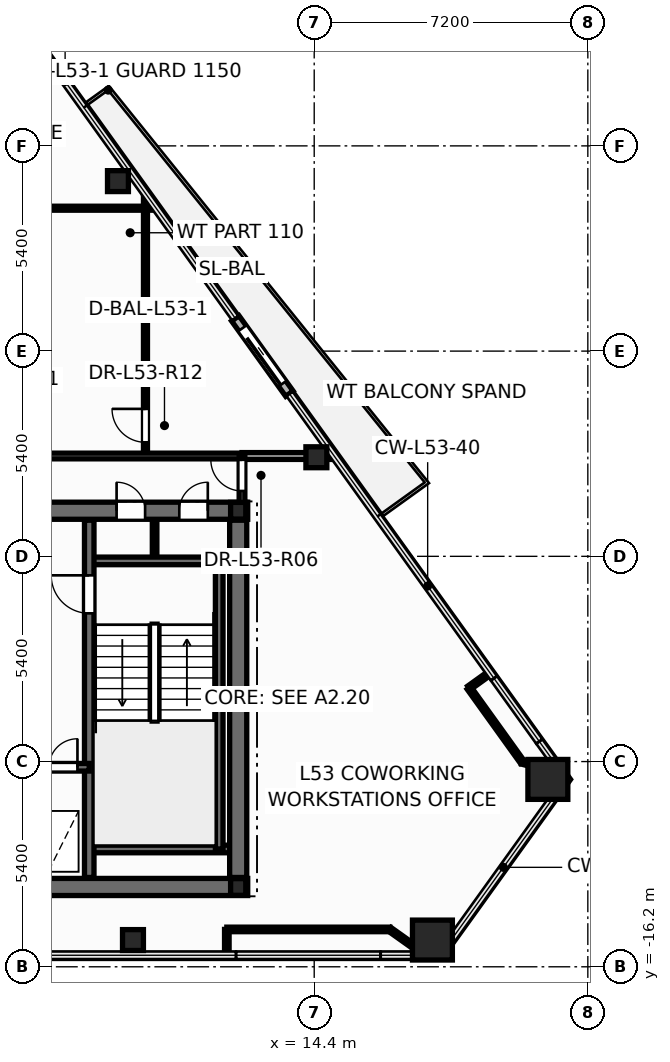
"""IFC4 building model, lengths in metres.
Left out: names, types, materials, properties, quantities, classifications, styles, units other than length and angle.
Written with IfcOpenShell. Run it as: python <this file> out.ifc"""

import sys

from ifc_helpers import new_model, si_unit, direction, frame, frame_2d, origin, origin_2d, place, context, subcontext, project, spatial, rectangle, hollow_rectangle, hollow_circle, i_section, extrude, element, fill, save


model = new_model("IFC4")
c1 = context("Model", 3, precision=1e-05, world=origin(), true_north=direction((0.0, 1.0)))
c2 = subcontext(c1, "Body", "Model", "MODEL_VIEW")
j1 = project(units=[si_unit("LENGTHUNIT", "METRE"), si_unit("PLANEANGLEUNIT", "RADIAN")], contexts=[c1])
p1 = place(None, origin())
s1 = spatial("IfcSite", under=j1, at=p1, CompositionType="ELEMENT")
p2 = place(p1, origin())
s2 = spatial("IfcBuilding", under=s1, at=p2, CompositionType="ELEMENT")
p3 = place(p2, frame((0.0, 0.0, 203.7)))
s3 = spatial("IfcBuildingStorey", under=s2, at=p3, CompositionType="ELEMENT", Elevation=203.7)
for number, where, z_axis, x_axis in (
    (1, (17.511, -15.497, 0.0), (0.0, 0.0, 1.0), (1.0, 0.0, 0.0)),
    (2, (20.548, -11.27, 0.0), (0.0, 0.0, 1.0), (1.0, 0.0, 0.0)),
):
    element("IfcColumn", number, at=place(p3, frame(where, z_axis=z_axis, x_axis=x_axis)), inside=s3, PredefinedType="COLUMN", context=c2, shape_type="SweptSolid", body=[
        extrude(hollow_rectangle(XDim=1.05, YDim=1.05, WallThickness=0.045, at=origin_2d()), origin(), (0.0, 0.0, 1.0), 3.6),
    ])
for number, where, z_axis, x_axis in (
    (3, (9.631, -15.497, 0.0), (0.0, 0.0, 1.0), (1.0, 0.0, 0.0)),
    (4, (14.457, -2.793, 0.0), (0.0, 0.0, 1.0), (1.0, 0.0, 0.0)),
    (5, (9.236, 4.473, 0.0), (0.0, 0.0, 1.0), (1.0, 0.0, 0.0)),
):
    element("IfcColumn", number, at=place(p3, frame(where, z_axis=z_axis, x_axis=x_axis)), inside=s3, PredefinedType="COLUMN", context=c2, shape_type="SweptSolid", body=[
        extrude(hollow_circle(Radius=0.275, WallThickness=0.024, at=origin_2d()), origin(), (0.0, 0.0, 1.0), 3.6),
    ])
for number, where, z_axis, x_axis in (
    (6, (12.4, -14.1, 0.0), (0.0, 0.0, 1.0), (1.0, 0.0, 0.0)),
    (7, (12.4, -4.2, 0.0), (0.0, 0.0, 1.0), (1.0, 0.0, 0.0)),
):
    element("IfcColumn", number, at=place(p3, frame(where, z_axis=z_axis, x_axis=x_axis)), inside=s3, PredefinedType="COLUMN", context=c2, shape_type="SweptSolid", body=[
        extrude(i_section(OverallWidth=0.4, OverallDepth=0.44, WebThickness=0.028, FlangeThickness=0.04, at=origin_2d()), origin(), (0.0, 0.0, 1.0), 3.6),
    ])
p4 = place(p3, frame((13.747, -1.12, -0.015), z_axis=(0.0, 0.0, 1.0), x_axis=(-0.58349791381, 0.812114637585, 0.0)))
e8 = element("IfcWall", 8, at=p4, inside=s3, PredefinedType="STANDARD", context=c2, shape_type="SweptSolid", body=[
    extrude(rectangle(XDim=2.44, YDim=0.24, at=frame_2d((1.22, 0.0))), origin(), (0.0, 0.0, 1.0), 2.802),
])
p5 = place(p4, frame((0.32, 0.0, 0.015)))
e9 = element("IfcOpeningElement", 9, at=p5, cuts=e8, PredefinedType="OPENING", context=c2, shape_type="SweptSolid", body=[
    extrude(rectangle(XDim=1.806, YDim=2.204, at=frame_2d((0.9, 1.102))), frame((0.0, 0.13, 0.0), z_axis=(0.0, -1.0, 0.0), x_axis=(1.0, 0.0, 0.0)), (0.0, 0.0, 1.0), 0.26),
])
p6 = place(p3, frame((10.2, -5.52, 0.0), z_axis=(0.0, 0.0, 1.0), x_axis=(0.0, 1.0, 0.0)))
e10 = element("IfcWall", 10, at=p6, inside=s3, PredefinedType="PARTITIONING", context=c2, shape_type="SweptSolid", body=[
    extrude(rectangle(XDim=1.12, YDim=0.12, at=frame_2d((0.56, 0.0))), origin(), (0.0, 0.0, 1.0), 3.345),
])
p7 = place(p3, frame((-12.65, -14.1, 0.0), z_axis=(0.0, 0.0, 1.0), x_axis=(1.0, 0.0, 0.0)))
e11 = element("IfcWall", 11, at=p7, inside=s3, PredefinedType="SHEAR", context=c2, shape_type="SweptSolid", body=[
    extrude(rectangle(XDim=25.3, YDim=0.45, at=frame_2d((12.65, 0.0))), origin(), (0.0, 0.0, 1.0), 3.6),
])
p8 = place(p3, frame((-12.65, -4.2, 0.0), z_axis=(0.0, 0.0, 1.0), x_axis=(1.0, 0.0, 0.0)))
e12 = element("IfcWall", 12, at=p8, inside=s3, PredefinedType="SHEAR", context=c2, shape_type="SweptSolid", body=[
    extrude(rectangle(XDim=25.3, YDim=0.45, at=frame_2d((12.65, 0.0))), origin(), (0.0, 0.0, 1.0), 3.6),
])
p9 = place(p8, frame((0.95, 0.0, 0.0)))
e13 = element("IfcOpeningElement", 13, at=p9, cuts=e12, PredefinedType="OPENING", context=c2, shape_type="SweptSolid", body=[
    extrude(rectangle(XDim=0.756, YDim=2.054, at=frame_2d((0.375, 1.027))), frame((0.0, 0.235, 0.0), z_axis=(0.0, -1.0, 0.0), x_axis=(1.0, 0.0, 0.0)), (0.0, 0.0, 1.0), 0.47),
])
p10 = place(p8, frame((2.6, 0.0, 0.0)))
e14 = element("IfcOpeningElement", 14, at=p10, cuts=e12, PredefinedType="OPENING", context=c2, shape_type="SweptSolid", body=[
    extrude(rectangle(XDim=0.756, YDim=2.054, at=frame_2d((0.375, 1.027))), frame((0.0, 0.235, 0.0), z_axis=(0.0, -1.0, 0.0), x_axis=(1.0, 0.0, 0.0)), (0.0, 0.0, 1.0), 0.47),
])
p11 = place(p8, frame((21.85, 0.0, 0.0)))
e15 = element("IfcOpeningElement", 15, at=p11, cuts=e12, PredefinedType="OPENING", context=c2, shape_type="SweptSolid", body=[
    extrude(rectangle(XDim=0.756, YDim=2.054, at=frame_2d((0.375, 1.027))), frame((0.0, 0.235, 0.0), z_axis=(0.0, -1.0, 0.0), x_axis=(1.0, 0.0, 0.0)), (0.0, 0.0, 1.0), 0.47),
])
p12 = place(p8, frame((23.5, 0.0, 0.0)))
e16 = element("IfcOpeningElement", 16, at=p12, cuts=e12, PredefinedType="OPENING", context=c2, shape_type="SweptSolid", body=[
    extrude(rectangle(XDim=0.756, YDim=2.054, at=frame_2d((0.375, 1.027))), frame((0.0, 0.235, 0.0), z_axis=(0.0, -1.0, 0.0), x_axis=(1.0, 0.0, 0.0)), (0.0, 0.0, 1.0), 0.47),
])
p13 = place(p8, frame((5.85, 0.0, 0.0)))
e17 = element("IfcOpeningElement", 17, at=p13, cuts=e12, PredefinedType="OPENING", context=c2, shape_type="SweptSolid", body=[
    extrude(rectangle(XDim=1.006, YDim=2.104, at=frame_2d((0.5, 1.052))), frame((0.0, 0.235, 0.0), z_axis=(0.0, -1.0, 0.0), x_axis=(1.0, 0.0, 0.0)), (0.0, 0.0, 1.0), 0.47),
])
p14 = place(p8, frame((10.35, 0.0, 0.0)))
e18 = element("IfcOpeningElement", 18, at=p14, cuts=e12, PredefinedType="OPENING", context=c2, shape_type="SweptSolid", body=[
    extrude(rectangle(XDim=1.406, YDim=2.154, at=frame_2d((0.7, 1.077))), frame((0.0, 0.235, 0.0), z_axis=(0.0, -1.0, 0.0), x_axis=(1.0, 0.0, 0.0)), (0.0, 0.0, 1.0), 0.47),
])
p15 = place(p8, frame((18.45, 0.0, 0.0)))
e19 = element("IfcOpeningElement", 19, at=p15, cuts=e12, PredefinedType="OPENING", context=c2, shape_type="SweptSolid", body=[
    extrude(rectangle(XDim=1.006, YDim=2.104, at=frame_2d((0.5, 1.052))), frame((0.0, 0.235, 0.0), z_axis=(0.0, -1.0, 0.0), x_axis=(1.0, 0.0, 0.0)), (0.0, 0.0, 1.0), 0.47),
])
for number, where, z_axis, x_axis in (
    (20, (8.48, -5.52, 0.0), (0.0, 0.0, 1.0), (1.0, 0.0, 0.0)),
    (21, (8.48, -13.1, 0.0), (0.0, 0.0, 1.0), (1.0, 0.0, 0.0)),
):
    element("IfcWall", number, at=place(p3, frame(where, z_axis=z_axis, x_axis=x_axis)), inside=s3, PredefinedType="SOLIDWALL", context=c2, shape_type="SweptSolid", body=[
        extrude(rectangle(XDim=3.87, YDim=0.2, at=frame_2d((1.935, 0.0))), origin(), (0.0, 0.0, 1.0), 3.6),
    ])
p16 = place(p3, frame((11.9, -13.1, 0.0), z_axis=(0.0, 0.0, 1.0), x_axis=(0.0, 1.0, 0.0)))
e22 = element("IfcWall", 22, at=p16, inside=s3, PredefinedType="SOLIDWALL", context=c2, shape_type="SweptSolid", body=[
    extrude(rectangle(XDim=7.58, YDim=0.2, at=frame_2d((3.79, 0.0))), origin(), (0.0, 0.0, 1.0), 3.6),
])
p17 = place(p3, frame((8.48, -13.85, 0.0), z_axis=(0.0, 0.0, 1.0), x_axis=(0.0, 1.0, 0.0)))
e23 = element("IfcWall", 23, at=p17, inside=s3, PredefinedType="SHEAR", context=c2, shape_type="SweptSolid", body=[
    extrude(rectangle(XDim=9.4, YDim=0.25, at=frame_2d((4.7, 0.0))), origin(), (0.0, 0.0, 1.0), 3.6),
])
p18 = place(p17, frame((6.95, 0.0, 0.0)))
e24 = element("IfcOpeningElement", 24, at=p18, cuts=e23, PredefinedType="OPENING", context=c2, shape_type="SweptSolid", body=[
    extrude(rectangle(XDim=1.006, YDim=2.104, at=frame_2d((0.5, 1.052))), frame((0.0, 0.135, 0.0), z_axis=(0.0, -1.0, 0.0), x_axis=(1.0, 0.0, 0.0)), (0.0, 0.0, 1.0), 0.27),
])
p19 = place(p3, frame((5.12, -10.95, 0.0), z_axis=(0.0, 0.0, 1.0), x_axis=(1.0, 0.0, 0.0)))
e25 = element("IfcWall", 25, at=p19, inside=s3, PredefinedType="SOLIDWALL", context=c2, shape_type="SweptSolid", body=[
    extrude(rectangle(XDim=3.36, YDim=0.2, at=frame_2d((1.68, 0.0))), origin(), (0.0, 0.0, 1.0), 3.6),
])
p20 = place(p19, frame((0.42, 0.0, 0.0)))
e26 = element("IfcOpeningElement", 26, at=p20, cuts=e25, PredefinedType="OPENING", context=c2, shape_type="SweptSolid", body=[
    extrude(rectangle(XDim=1.106, YDim=2.104, at=frame_2d((0.55, 1.052))), frame((0.0, 0.11, 0.0), z_axis=(0.0, -1.0, 0.0), x_axis=(1.0, 0.0, 0.0)), (0.0, 0.0, 1.0), 0.22),
])
p21 = place(p19, frame((2.3, 0.0, 0.0)))
e27 = element("IfcOpeningElement", 27, at=p21, cuts=e25, PredefinedType="OPENING", context=c2, shape_type="SweptSolid", body=[
    extrude(rectangle(XDim=0.756, YDim=2.054, at=frame_2d((0.375, 1.027))), frame((0.0, 0.11, 0.0), z_axis=(0.0, -1.0, 0.0), x_axis=(1.0, 0.0, 0.0)), (0.0, 0.0, 1.0), 0.22),
])
p22 = place(p3, frame((12.4, -13.85, 0.0), z_axis=(0.0, 0.0, 1.0), x_axis=(0.0, 1.0, 0.0)))
e28 = element("IfcWall", 28, at=p22, inside=s3, PredefinedType="SHEAR", context=c2, shape_type="SweptSolid", body=[
    extrude(rectangle(XDim=9.4, YDim=0.45, at=frame_2d((4.7, 0.0))), origin(), (0.0, 0.0, 1.0), 3.6),
])
p23 = place(p3, frame((9.96, -2.76, 0.0), z_axis=(0.0, 0.0, 1.0), x_axis=(0.0, 1.0, 0.0)))
e29 = element("IfcWall", 29, at=p23, inside=s3, PredefinedType="PARTITIONING", context=c2, shape_type="SweptSolid", body=[
    extrude(rectangle(XDim=6.911, YDim=0.105, at=frame_2d((3.455, 0.0))), origin(), (0.0, 0.0, 1.0), 2.62),
])
p24 = place(p23, frame((0.36, 0.0, 0.0)))
e30 = element("IfcOpeningElement", 30, at=p24, cuts=e29, PredefinedType="OPENING", context=c2, shape_type="SweptSolid", body=[
    extrude(rectangle(XDim=0.886, YDim=2.104, at=frame_2d((0.44, 1.052))), frame((0.0, 0.062, 0.0), z_axis=(0.0, -1.0, 0.0), x_axis=(1.0, 0.0, 0.0)), (0.0, 0.0, 1.0), 0.125),
])
p25 = place(p3, frame((2.68, 3.76, 0.0), z_axis=(0.0, 0.0, 1.0), x_axis=(1.0, 0.0, 0.0)))
e31 = element("IfcWall", 31, at=p25, inside=s3, PredefinedType="PARTITIONING", context=c2, shape_type="SweptSolid", body=[
    extrude(rectangle(XDim=7.561, YDim=0.105, at=frame_2d((3.78, 0.0))), origin(), (0.0, 0.0, 1.0), 2.62),
])
p26 = place(p3, frame((5.762, -2.76, 0.0), z_axis=(0.0, 0.0, 1.0), x_axis=(1.0, 0.0, 0.0)))
e32 = element("IfcWall", 32, at=p26, inside=s3, PredefinedType="PARTITIONING", context=c2, shape_type="SweptSolid", body=[
    extrude(rectangle(XDim=6.738, YDim=0.15, at=frame_2d((3.369, 0.0))), origin(), (0.0, 0.0, 1.0), 2.32),
])
p27 = place(p3, frame((12.101, -15.217, 0.0), z_axis=(0.0, 0.0, 1.0), x_axis=(1.0, 0.0, 0.0)))
e33 = element("IfcWall", 33, at=p27, inside=s3, PredefinedType="PARTITIONING", context=c2, shape_type="SweptSolid", body=[
    extrude(rectangle(XDim=4.288, YDim=0.12, at=frame_2d((2.144, 0.0))), origin(), (0.0, 0.0, 1.0), 3.345),
])
p28 = place(p3, frame((12.5, -2.76, 0.0), z_axis=(0.0, 0.0, 1.0), x_axis=(1.0, 0.0, 0.0)))
e34 = element("IfcWall", 34, at=p28, inside=s3, PredefinedType="PARTITIONING", context=c2, shape_type="SweptSolid", body=[
    extrude(rectangle(XDim=2.426, YDim=0.18, at=frame_2d((1.213, 0.0))), origin(), (0.0, 0.0, 1.0), 2.62),
])
p29 = place(p3, frame((19.874, -10.811, 0.0), z_axis=(0.0, 0.0, 1.0), x_axis=(-0.583564770882, 0.812066597137, 0.0)))
e35 = element("IfcWall", 35, at=p29, inside=s3, PredefinedType="PARTITIONING", context=c2, shape_type="SweptSolid", body=[
    extrude(rectangle(XDim=2.4, YDim=0.12, at=frame_2d((1.2, 0.0))), origin(), (0.0, 0.0, 1.0), 2.32),
])
p30 = place(p3, frame((12.5, -4.24, 0.0), z_axis=(0.0, 0.0, 1.0), x_axis=(0.0, 1.0, 0.0)))
e36 = element("IfcWall", 36, at=p30, inside=s3, PredefinedType="PARTITIONING", context=c2, shape_type="SweptSolid", body=[
    extrude(rectangle(XDim=1.48, YDim=0.15, at=frame_2d((0.74, 0.0))), origin(), (0.0, 0.0, 1.0), 2.32),
])
p31 = place(p30, frame((0.56, 0.0, 0.0)))
e37 = element("IfcOpeningElement", 37, at=p31, cuts=e36, PredefinedType="OPENING", context=c2, shape_type="SweptSolid", body=[
    extrude(rectangle(XDim=0.826, YDim=2.104, at=frame_2d((0.41, 1.052))), frame((0.0, 0.085, 0.0), z_axis=(0.0, -1.0, 0.0), x_axis=(1.0, 0.0, 0.0)), (0.0, 0.0, 1.0), 0.17),
])
p32 = place(p3, frame((16.389, -15.217, 0.0), z_axis=(0.0, 0.0, 1.0), x_axis=(0.814775258606, -0.579776920861, 0.0)))
e38 = element("IfcWall", 38, at=p32, inside=s3, PredefinedType="PARTITIONING", context=c2, shape_type="SweptSolid", body=[
    extrude(rectangle(XDim=0.854, YDim=0.12, at=frame_2d((0.427, 0.0))), origin(), (0.0, 0.0, 1.0), 2.787),
])
p33 = place(p3, frame((20.698, -11.027, 0.0), z_axis=(0.0, 0.0, 1.0), x_axis=(-0.967403978064, 0.253238115667, 0.0)))
e39 = element("IfcWall", 39, at=p33, inside=s3, PredefinedType="PARTITIONING", context=c2, shape_type="SweptSolid", body=[
    extrude(rectangle(XDim=0.852, YDim=0.12, at=frame_2d((0.426, 0.0))), origin(), (0.0, 0.0, 1.0), 2.32),
])
for number, where, z_axis, x_axis in (
    (40, (12.101, -15.887, 0.0), (0.0, 0.0, 1.0), (0.0, 1.0, 0.0)),
    (41, (18.474, -8.862, 0.0), (0.0, 0.0, 1.0), (0.812, 0.584, 0.0)),
):
    element("IfcWall", number, at=place(p3, frame(where, z_axis=z_axis, x_axis=x_axis)), inside=s3, PredefinedType="PARTITIONING", context=c2, shape_type="SweptSolid", body=[
        extrude(rectangle(XDim=0.67, YDim=0.12, at=frame_2d((0.335, 0.0))), origin(), (0.0, 0.0, 1.0), 2.787),
    ])
p34 = place(p5, origin())
e42 = element("IfcDoor", 42, at=p34, inside=s3, OperationType="SLIDING_TO_LEFT", PredefinedType="DOOR", context=c2, shape_type="SweptSolid", body=[
    extrude(rectangle(XDim=1.8, YDim=2.2, at=frame_2d((0.9, 1.1))), frame((0.0, 0.025, 0.0), z_axis=(0.0, -1.0, 0.0), x_axis=(1.0, 0.0, 0.0)), (0.0, 0.0, 1.0), 0.05),
])
fill(e9, e42)
p35 = place(p18, origin())
e43 = element("IfcDoor", 43, at=p35, inside=s3, OperationType="SINGLE_SWING_RIGHT", PredefinedType="DOOR", context=c2, shape_type="SweptSolid", body=[
    extrude(rectangle(XDim=1.0, YDim=2.1, at=frame_2d((0.5, 1.05))), frame((0.0, 0.025, 0.0), z_axis=(0.0, -1.0, 0.0), x_axis=(1.0, 0.0, 0.0)), (0.0, 0.0, 1.0), 0.05),
])
fill(e24, e43)
p36 = place(p21, origin())
e44 = element("IfcDoor", 44, at=p36, inside=s3, OperationType="SINGLE_SWING_RIGHT", PredefinedType="DOOR", context=c2, shape_type="SweptSolid", body=[
    extrude(rectangle(XDim=0.75, YDim=2.05, at=frame_2d((0.375, 1.025))), frame((0.0, 0.025, 0.0), z_axis=(0.0, -1.0, 0.0), x_axis=(1.0, 0.0, 0.0)), (0.0, 0.0, 1.0), 0.05),
])
fill(e27, e44)
p37 = place(p11, origin())
e45 = element("IfcDoor", 45, at=p37, inside=s3, OperationType="SINGLE_SWING_LEFT", PredefinedType="DOOR", context=c2, shape_type="SweptSolid", body=[
    extrude(rectangle(XDim=0.75, YDim=2.05, at=frame_2d((0.375, 1.025))), frame((0.0, 0.025, 0.0), z_axis=(0.0, -1.0, 0.0), x_axis=(1.0, 0.0, 0.0)), (0.0, 0.0, 1.0), 0.05),
])
fill(e15, e45)
p38 = place(p12, origin())
e46 = element("IfcDoor", 46, at=p38, inside=s3, OperationType="SINGLE_SWING_RIGHT", PredefinedType="DOOR", context=c2, shape_type="SweptSolid", body=[
    extrude(rectangle(XDim=0.75, YDim=2.05, at=frame_2d((0.375, 1.025))), frame((0.0, 0.025, 0.0), z_axis=(0.0, -1.0, 0.0), x_axis=(1.0, 0.0, 0.0)), (0.0, 0.0, 1.0), 0.05),
])
fill(e16, e46)
p39 = place(p31, origin())
e47 = element("IfcDoor", 47, at=p39, inside=s3, OperationType="SINGLE_SWING_RIGHT", PredefinedType="DOOR", context=c2, shape_type="SweptSolid", body=[
    extrude(rectangle(XDim=0.82, YDim=2.1, at=frame_2d((0.41, 1.05))), frame((0.0, 0.025, 0.0), z_axis=(0.0, -1.0, 0.0), x_axis=(1.0, 0.0, 0.0)), (0.0, 0.0, 1.0), 0.05),
])
fill(e37, e47)
p40 = place(p24, origin())
e48 = element("IfcDoor", 48, at=p40, inside=s3, OperationType="SINGLE_SWING_RIGHT", PredefinedType="DOOR", context=c2, shape_type="SweptSolid", body=[
    extrude(rectangle(XDim=0.88, YDim=2.1, at=frame_2d((0.44, 1.05))), frame((0.0, 0.025, 0.0), z_axis=(0.0, -1.0, 0.0), x_axis=(1.0, 0.0, 0.0)), (0.0, 0.0, 1.0), 0.05),
])
fill(e30, e48)
save(model, sys.argv[1])
